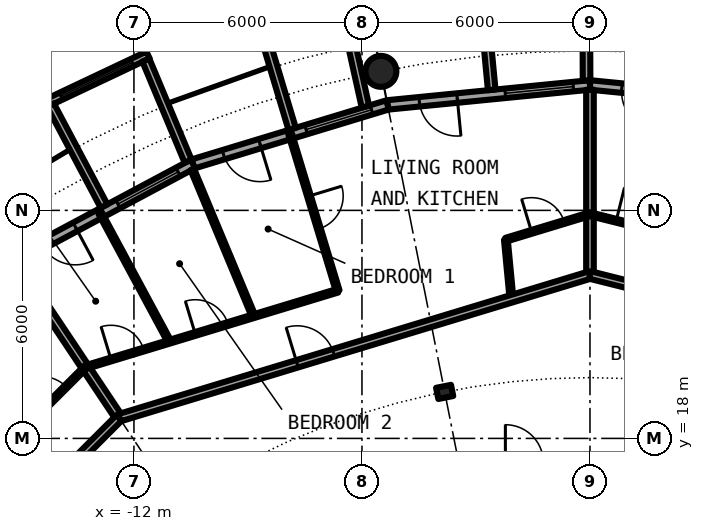
"""IFC4 building model, lengths in metres.
Left out: names, types, materials, properties, quantities, classifications, styles, units other than length and angle.
Written with IfcOpenShell. Run it as: python <this file> out.ifc"""

import sys

from ifc_helpers import new_model, si_unit, direction, frame, frame_2d, origin, origin_2d, place, context, subcontext, project, spatial, rectangle, circle, hollow_circle, i_section, extrude, element, fill, save


model = new_model("IFC4")
c1 = context("Model", 3, precision=1e-05, world=origin(), true_north=direction((0.0, 1.0)))
c2 = subcontext(c1, "Body", "Model", "MODEL_VIEW")
j1 = project(units=[si_unit("LENGTHUNIT", "METRE"), si_unit("PLANEANGLEUNIT", "RADIAN")], contexts=[c1])
p1 = place(None, origin())
s1 = spatial("IfcSite", under=j1, at=p1, CompositionType="ELEMENT")
p2 = place(p1, origin())
s2 = spatial("IfcBuilding", under=s1, at=p2, CompositionType="ELEMENT")
p3 = place(p2, frame((0.0, 0.0, 199.35)))
s3 = spatial("IfcBuildingStorey", under=s2, at=p3, CompositionType="ELEMENT", Elevation=199.35)
p4 = place(p3, frame((-5.501, 27.658, 0.0), z_axis=(0.0, 0.0, 1.0), x_axis=(1.0, 0.0, 0.0)))
e1 = element("IfcColumn", 1, at=p4, inside=s3, PredefinedType="COLUMN", context=c2, shape_type="SweptSolid", body=[
    extrude(hollow_circle(Radius=0.406, WallThickness=0.03, at=origin_2d()), origin(), (0.0, 0.0, 1.0), 3.05),
])
p5 = place(p3, frame((-3.824, 19.223, 0.0), z_axis=(0.0, 0.0, 1.0), x_axis=(-0.195090322016, 0.980785280403, 0.0)))
e2 = element("IfcColumn", 2, at=p5, inside=s3, PredefinedType="COLUMN", context=c2, shape_type="SweptSolid", body=[
    extrude(i_section(OverallWidth=0.3, OverallDepth=0.4, WebThickness=0.013, FlangeThickness=0.024, FilletRadius=0.027, at=origin_2d()), origin(), (0.0, 0.0, 1.0), 3.05),
])
p6 = place(p3, frame((5.326, 26.775, 0.0), z_axis=(0.0, 0.0, 1.0), x_axis=(-0.995173996315, 0.098126026407, 0.0)))
e3 = element("IfcWall", 3, at=p6, inside=s3, PredefinedType="SOLIDWALL", context=c2, shape_type="SweptSolid", body=[
    extrude(rectangle(XDim=5.352, YDim=0.25, at=frame_2d((2.676, 0.0))), origin(), (0.0, 0.0, 1.0), 2.7),
])
p7 = place(p6, frame((0.441, 0.0, 0.3)))
e4 = element("IfcOpeningElement", 4, at=p7, cuts=e3, PredefinedType="OPENING", context=c2, shape_type="SweptSolid", body=[
    extrude(rectangle(XDim=1.8, YDim=2.1, at=frame_2d((0.9, 1.05))), frame((0.0, 0.135, 0.0), z_axis=(0.0, -1.0, 0.0), x_axis=(1.0, 0.0, 0.0)), (0.0, 0.0, 1.0), 0.27),
])
p8 = place(p6, frame((3.51, 0.0, 0.0)))
e5 = element("IfcOpeningElement", 5, at=p8, cuts=e3, PredefinedType="OPENING", context=c2, shape_type="SweptSolid", body=[
    extrude(rectangle(XDim=1.0, YDim=2.2, at=frame_2d((0.5, 1.1))), frame((0.0, 0.135, 0.0), z_axis=(0.0, -1.0, 0.0), x_axis=(1.0, 0.0, 0.0)), (0.0, 0.0, 1.0), 0.27),
])
p9 = place(p3, frame((0.0, 27.3, 0.0), z_axis=(0.0, 0.0, 1.0), x_axis=(-0.995173996315, -0.098126026407, 0.0)))
e6 = element("IfcWall", 6, at=p9, inside=s3, PredefinedType="SOLIDWALL", context=c2, shape_type="SweptSolid", body=[
    extrude(rectangle(XDim=5.352, YDim=0.25, at=frame_2d((2.676, 0.0))), origin(), (0.0, 0.0, 1.0), 2.7),
])
p10 = place(p9, frame((0.441, 0.0, 0.3)))
e7 = element("IfcOpeningElement", 7, at=p10, cuts=e6, PredefinedType="OPENING", context=c2, shape_type="SweptSolid", body=[
    extrude(rectangle(XDim=1.8, YDim=2.1, at=frame_2d((0.9, 1.05))), frame((0.0, 0.135, 0.0), z_axis=(0.0, -1.0, 0.0), x_axis=(1.0, 0.0, 0.0)), (0.0, 0.0, 1.0), 0.27),
])
p11 = place(p9, frame((3.51, 0.0, 0.0)))
e8 = element("IfcOpeningElement", 8, at=p11, cuts=e6, PredefinedType="OPENING", context=c2, shape_type="SweptSolid", body=[
    extrude(rectangle(XDim=1.0, YDim=2.2, at=frame_2d((0.5, 1.1))), frame((0.0, 0.135, 0.0), z_axis=(0.0, -1.0, 0.0), x_axis=(1.0, 0.0, 0.0)), (0.0, 0.0, 1.0), 0.27),
])
p12 = place(p3, frame((-0.09, 27.417, -0.03), z_axis=(0.0, 0.0, 1.0), x_axis=(-0.00347308367, 0.999993968827, 0.0)))
e9 = element("IfcWall", 9, at=p12, inside=s3, PredefinedType="SOLIDWALL", context=c2, shape_type="SweptSolid", body=[
    extrude(rectangle(XDim=2.882, YDim=0.2, at=frame_2d((1.441, 0.0))), origin(), (0.0, 0.0, 1.0), 2.73),
])
p13 = place(p3, frame((-2.586, 27.171, -0.03), z_axis=(0.0, 0.0, 1.0), x_axis=(-0.094548432284, 0.995520262954, 0.0)))
e10 = element("IfcWall", 10, at=p13, inside=s3, PredefinedType="SOLIDWALL", context=c2, shape_type="SweptSolid", body=[
    extrude(rectangle(XDim=3.006, YDim=0.2, at=frame_2d((1.503, 0.0))), origin(), (0.0, 0.0, 1.0), 2.73),
])
p14 = place(p3, frame((-5.326, 26.775, 0.0), z_axis=(0.0, 0.0, 1.0), x_axis=(-0.956965678721, -0.290201119486, 0.0)))
e11 = element("IfcWall", 11, at=p14, inside=s3, PredefinedType="SOLIDWALL", context=c2, shape_type="SweptSolid", body=[
    extrude(rectangle(XDim=5.351, YDim=0.25, at=frame_2d((2.676, 0.0))), origin(), (0.0, 0.0, 1.0), 2.7),
])
p15 = place(p14, frame((0.441, 0.0, 0.3)))
e12 = element("IfcOpeningElement", 12, at=p15, cuts=e11, PredefinedType="OPENING", context=c2, shape_type="SweptSolid", body=[
    extrude(rectangle(XDim=1.8, YDim=2.1, at=frame_2d((0.9, 1.05))), frame((0.0, 0.135, 0.0), z_axis=(0.0, -1.0, 0.0), x_axis=(1.0, 0.0, 0.0)), (0.0, 0.0, 1.0), 0.27),
])
p16 = place(p14, frame((3.51, 0.0, 0.0)))
e13 = element("IfcOpeningElement", 13, at=p16, cuts=e11, PredefinedType="OPENING", context=c2, shape_type="SweptSolid", body=[
    extrude(rectangle(XDim=1.0, YDim=2.2, at=frame_2d((0.5, 1.1))), frame((0.0, 0.135, 0.0), z_axis=(0.0, -1.0, 0.0), x_axis=(1.0, 0.0, 0.0)), (0.0, 0.0, 1.0), 0.27),
])
p17 = place(p3, frame((-5.909, 26.729, -0.03), z_axis=(0.0, 0.0, 1.0), x_axis=(-0.216409053917, 0.976302781612, 0.0)))
e14 = element("IfcWall", 14, at=p17, inside=s3, PredefinedType="SOLIDWALL", context=c2, shape_type="SweptSolid", body=[
    extrude(rectangle(XDim=2.925, YDim=0.2, at=frame_2d((1.463, 0.0))), origin(), (0.0, 0.0, 1.0), 2.73),
])
p18 = place(p3, frame((-7.837, 26.144, -0.03), z_axis=(0.0, 0.0, 1.0), x_axis=(-0.287064767992, 0.957911174889, 0.0)))
e15 = element("IfcWall", 15, at=p18, inside=s3, PredefinedType="SOLIDWALL", context=c2, shape_type="SweptSolid", body=[
    extrude(rectangle(XDim=3.006, YDim=0.2, at=frame_2d((1.503, 0.0))), origin(), (0.0, 0.0, 1.0), 2.73),
])
p19 = place(p3, frame((-10.447, 25.222, 0.0), z_axis=(0.0, 0.0, 1.0), x_axis=(-0.881915646801, -0.471407246368, 0.0)))
e16 = element("IfcWall", 16, at=p19, inside=s3, PredefinedType="SOLIDWALL", context=c2, shape_type="SweptSolid", body=[
    extrude(rectangle(XDim=5.352, YDim=0.25, at=frame_2d((2.676, 0.0))), origin(), (0.0, 0.0, 1.0), 2.7),
])
p20 = place(p19, frame((0.441, 0.0, 0.3)))
e17 = element("IfcOpeningElement", 17, at=p20, cuts=e16, PredefinedType="OPENING", context=c2, shape_type="SweptSolid", body=[
    extrude(rectangle(XDim=1.8, YDim=2.1, at=frame_2d((0.9, 1.05))), frame((0.0, 0.135, 0.0), z_axis=(0.0, -1.0, 0.0), x_axis=(1.0, 0.0, 0.0)), (0.0, 0.0, 1.0), 0.27),
])
p21 = place(p19, frame((3.51, 0.0, 0.0)))
e18 = element("IfcOpeningElement", 18, at=p21, cuts=e16, PredefinedType="OPENING", context=c2, shape_type="SweptSolid", body=[
    extrude(rectangle(XDim=1.0, YDim=2.2, at=frame_2d((0.5, 1.1))), frame((0.0, 0.135, 0.0), z_axis=(0.0, -1.0, 0.0), x_axis=(1.0, 0.0, 0.0)), (0.0, 0.0, 1.0), 0.27),
])
p22 = place(p3, frame((-11.629, 28.088, -0.03), z_axis=(0.0, 0.0, 1.0), x_axis=(-0.904000060331, -0.427532327342, 0.0)))
e19 = element("IfcWall", 19, at=p22, inside=s3, PredefinedType="SOLIDWALL", context=c2, shape_type="SweptSolid", body=[
    extrude(rectangle(XDim=2.993, YDim=0.2, at=frame_2d((1.497, 0.0))), origin(), (0.0, 0.0, 1.0), 2.73),
])
p23 = place(p22, frame((0.457, 0.0, 0.33)))
e20 = element("IfcOpeningElement", 20, at=p23, cuts=e19, PredefinedType="OPENING", context=c2, shape_type="SweptSolid", body=[
    extrude(circle(Radius=1.04, at=frame_2d((1.04, 1.04))), frame((0.0, 0.11, 0.0), z_axis=(0.0, -1.0, 0.0), x_axis=(1.0, 0.0, 0.0)), (0.0, 0.0, 1.0), 0.22),
])
p24 = place(p3, frame((-10.575, 25.295, -0.03), z_axis=(0.0, 0.0, 1.0), x_axis=(-0.385697364644, 0.922625353492, 0.0)))
e21 = element("IfcWall", 21, at=p24, inside=s3, PredefinedType="SOLIDWALL", context=c2, shape_type="SweptSolid", body=[
    extrude(rectangle(XDim=2.883, YDim=0.2, at=frame_2d((1.442, 0.0))), origin(), (0.0, 0.0, 1.0), 2.73),
])
p25 = place(p3, frame((-12.787, 24.113, -0.03), z_axis=(0.0, 0.0, 1.0), x_axis=(-0.468365282436, 0.883534924159, 0.0)))
e22 = element("IfcWall", 22, at=p25, inside=s3, PredefinedType="SOLIDWALL", context=c2, shape_type="SweptSolid", body=[
    extrude(rectangle(XDim=3.006, YDim=0.2, at=frame_2d((1.503, 0.0))), origin(), (0.0, 0.0, 1.0), 2.73),
])
p26 = place(p3, frame((-15.097, 22.596, 0.0), z_axis=(0.0, 0.0, 1.0), x_axis=(0.555462686211, -0.831541462723, 0.0)))
e23 = element("IfcWall", 23, at=p26, inside=s3, PredefinedType="PARTITIONING", context=c2, shape_type="SweptSolid", body=[
    extrude(rectangle(XDim=4.875, YDim=0.2, at=frame_2d((2.438, 0.0))), origin(), (0.0, 0.0, 1.0), 2.7),
])
p27 = place(p3, frame((-12.887, 23.925, 0.0), z_axis=(0.0, 0.0, 1.0), x_axis=(0.474281720599, -0.88037313084, 0.0)))
e24 = element("IfcWall", 24, at=p27, inside=s3, PredefinedType="PARTITIONING", context=c2, shape_type="SweptSolid", body=[
    extrude(rectangle(XDim=3.842, YDim=0.1, at=frame_2d((1.921, 0.0))), origin(), (0.0, 0.0, 1.0), 2.7),
])
p28 = place(p3, frame((-10.465, 25.079, 0.0), z_axis=(0.0, 0.0, 1.0), x_axis=(0.385232176411, -0.922819684585, 0.0)))
e25 = element("IfcWall", 25, at=p28, inside=s3, PredefinedType="PARTITIONING", context=c2, shape_type="SweptSolid", body=[
    extrude(rectangle(XDim=4.187, YDim=0.1, at=frame_2d((2.094, 0.0))), origin(), (0.0, 0.0, 1.0), 2.7),
])
p29 = place(p3, frame((-7.888, 26.005, 0.0), z_axis=(0.0, 0.0, 1.0), x_axis=(0.290193157742, -0.956968093094, 0.0)))
e26 = element("IfcWall", 26, at=p29, inside=s3, PredefinedType="PARTITIONING", context=c2, shape_type="SweptSolid", body=[
    extrude(rectangle(XDim=4.304, YDim=0.1, at=frame_2d((2.152, 0.0))), origin(), (0.0, 0.0, 1.0), 2.7),
])
p30 = place(p29, frame((1.702, 0.0, 0.0)))
e27 = element("IfcOpeningElement", 27, at=p30, cuts=e26, PredefinedType="OPENING", context=c2, shape_type="SweptSolid", body=[
    extrude(rectangle(XDim=0.9, YDim=2.3, at=frame_2d((0.45, 1.15))), frame((0.0, 0.06, 0.0), z_axis=(0.0, -1.0, 0.0), x_axis=(1.0, 0.0, 0.0)), (0.0, 0.0, 1.0), 0.12),
])
p31 = place(p3, frame((-2.213, 23.229, 0.0), z_axis=(0.0, 0.0, 1.0), x_axis=(0.094720578196, -0.995503898569, 0.0)))
e28 = element("IfcWall", 28, at=p31, inside=s3, PredefinedType="PARTITIONING", context=c2, shape_type="SweptSolid", body=[
    extrude(rectangle(XDim=1.562, YDim=0.1, at=frame_2d((0.781, 0.0))), origin(), (0.0, 0.0, 1.0), 2.7),
])
p32 = place(p3, frame((0.0, 22.3, 0.0), z_axis=(0.0, 0.0, 1.0), x_axis=(0.0, 1.0, 0.0)))
e29 = element("IfcWall", 29, at=p32, inside=s3, PredefinedType="PARTITIONING", context=c2, shape_type="SweptSolid", body=[
    extrude(rectangle(XDim=4.875, YDim=0.2, at=frame_2d((2.438, 0.0))), origin(), (0.0, 0.0, 1.0), 2.7),
])
p33 = place(p3, frame((-12.389, 18.542, 0.0), z_axis=(0.0, 0.0, 1.0), x_axis=(0.956942051091, 0.290279022415, 0.0)))
e30 = element("IfcWall", 30, at=p33, inside=s3, PredefinedType="PARTITIONING", context=c2, shape_type="SweptSolid", body=[
    extrude(rectangle(XDim=12.946, YDim=0.2, at=frame_2d((6.473, 0.0))), origin(), (0.0, 0.0, 1.0), 2.7),
])
p34 = place(p33, frame((4.895, 0.0, 0.0)))
e31 = element("IfcOpeningElement", 31, at=p34, cuts=e30, PredefinedType="OPENING", context=c2, shape_type="SweptSolid", body=[
    extrude(rectangle(XDim=1.0, YDim=2.3, at=frame_2d((0.5, 1.15))), frame((0.0, 0.11, 0.0), z_axis=(0.0, -1.0, 0.0), x_axis=(1.0, 0.0, 0.0)), (0.0, 0.0, 1.0), 0.22),
])
p35 = place(p3, frame((0.0, 22.3, 0.0), z_axis=(0.0, 0.0, 1.0), x_axis=(0.969975381822, -0.243203122222, 0.0)))
e32 = element("IfcWall", 32, at=p35, inside=s3, PredefinedType="PARTITIONING", context=c2, shape_type="SweptSolid", body=[
    extrude(rectangle(XDim=10.843, YDim=0.2, at=frame_2d((5.421, 0.0))), origin(), (0.0, 0.0, 1.0), 2.7),
])
p36 = place(p35, frame((6.002, 0.0, 0.0)))
e33 = element("IfcOpeningElement", 33, at=p36, cuts=e32, PredefinedType="OPENING", context=c2, shape_type="SweptSolid", body=[
    extrude(rectangle(XDim=1.0, YDim=2.3, at=frame_2d((0.5, 1.15))), frame((0.0, 0.11, 0.0), z_axis=(0.0, -1.0, 0.0), x_axis=(1.0, 0.0, 0.0)), (0.0, 0.0, 1.0), 0.22),
])
p37 = place(p3, frame((-18.542, 12.389, 0.0), z_axis=(0.0, 0.0, 1.0), x_axis=(0.707106781187, 0.707106781187, 0.0)))
e34 = element("IfcWall", 34, at=p37, inside=s3, PredefinedType="PARTITIONING", context=c2, shape_type="SweptSolid", body=[
    extrude(rectangle(XDim=8.702, YDim=0.2, at=frame_2d((4.351, 0.0))), origin(), (0.0, 0.0, 1.0), 2.7),
])
p38 = place(p37, frame((4.938, 0.0, 0.0)))
e35 = element("IfcOpeningElement", 35, at=p38, cuts=e34, PredefinedType="OPENING", context=c2, shape_type="SweptSolid", body=[
    extrude(rectangle(XDim=1.0, YDim=2.3, at=frame_2d((0.5, 1.15))), frame((0.0, 0.11, 0.0), z_axis=(0.0, -1.0, 0.0), x_axis=(1.0, 0.0, 0.0)), (0.0, 0.0, 1.0), 0.22),
])
p39 = place(p3, frame((-13.281, 19.871, 0.0), z_axis=(0.0, 0.0, 1.0), x_axis=(0.956938868877, 0.290289512785, 0.0)))
e36 = element("IfcWall", 36, at=p39, inside=s3, PredefinedType="PARTITIONING", context=c2, shape_type="SweptSolid", body=[
    extrude(rectangle(XDim=6.941, YDim=0.1, at=frame_2d((3.47, 0.0))), origin(), (0.0, 0.0, 1.0), 2.7),
])
p40 = place(p39, frame((3.025, 0.0, 0.0)))
e37 = element("IfcOpeningElement", 37, at=p40, cuts=e36, PredefinedType="OPENING", context=c2, shape_type="SweptSolid", body=[
    extrude(rectangle(XDim=0.9, YDim=2.3, at=frame_2d((0.45, 1.15))), frame((0.0, 0.06, 0.0), z_axis=(0.0, -1.0, 0.0), x_axis=(1.0, 0.0, 0.0)), (0.0, 0.0, 1.0), 0.12),
])
p41 = place(p39, frame((0.708, 0.0, 0.0)))
e38 = element("IfcOpeningElement", 38, at=p41, cuts=e36, PredefinedType="OPENING", context=c2, shape_type="SweptSolid", body=[
    extrude(rectangle(XDim=0.9, YDim=2.3, at=frame_2d((0.45, 1.15))), frame((0.0, 0.06, 0.0), z_axis=(0.0, -1.0, 0.0), x_axis=(1.0, 0.0, 0.0)), (0.0, 0.0, 1.0), 0.12),
])
p42 = place(p3, frame((-2.216, 23.228, 0.0), z_axis=(0.0, 0.0, 1.0), x_axis=(0.956912517924, 0.290376364464, 0.0)))
e39 = element("IfcWall", 39, at=p42, inside=s3, PredefinedType="PARTITIONING", context=c2, shape_type="SweptSolid", body=[
    extrude(rectangle(XDim=2.314, YDim=0.1, at=frame_2d((1.157, 0.0))), origin(), (0.0, 0.0, 1.0), 2.7),
])
p43 = place(p42, frame((0.71, 0.0, 0.0)))
e40 = element("IfcOpeningElement", 40, at=p43, cuts=e39, PredefinedType="OPENING", context=c2, shape_type="SweptSolid", body=[
    extrude(rectangle(XDim=0.9, YDim=2.3, at=frame_2d((0.45, 1.15))), frame((0.0, 0.06, 0.0), z_axis=(0.0, -1.0, 0.0), x_axis=(1.0, 0.0, 0.0)), (0.0, 0.0, 1.0), 0.12),
])
p44 = place(p3, frame((0.003, 23.899, 0.0), z_axis=(0.0, 0.0, 1.0), x_axis=(0.970074448647, -0.242807668911, 0.0)))
e41 = element("IfcWall", 41, at=p44, inside=s3, PredefinedType="PARTITIONING", context=c2, shape_type="SweptSolid", body=[
    extrude(rectangle(XDim=2.323, YDim=0.1, at=frame_2d((1.161, 0.0))), origin(), (0.0, 0.0, 1.0), 2.7),
])
p45 = place(p44, frame((0.708, 0.0, 0.0)))
e42 = element("IfcOpeningElement", 42, at=p45, cuts=e41, PredefinedType="OPENING", context=c2, shape_type="SweptSolid", body=[
    extrude(rectangle(XDim=0.9, YDim=2.3, at=frame_2d((0.45, 1.15))), frame((0.0, 0.06, 0.0), z_axis=(0.0, -1.0, 0.0), x_axis=(1.0, 0.0, 0.0)), (0.0, 0.0, 1.0), 0.12),
])
p46 = place(p3, frame((-16.575, 16.575, 0.0), z_axis=(0.0, 0.0, 1.0), x_axis=(0.707080600289, 0.707132961115, 0.0)))
e43 = element("IfcWall", 43, at=p46, inside=s3, PredefinedType="PARTITIONING", context=c2, shape_type="SweptSolid", body=[
    extrude(rectangle(XDim=4.663, YDim=0.1, at=frame_2d((2.331, 0.0))), origin(), (0.0, 0.0, 1.0), 2.7),
])
p47 = place(p46, frame((3.043, 0.0, 0.0)))
e44 = element("IfcOpeningElement", 44, at=p47, cuts=e43, PredefinedType="OPENING", context=c2, shape_type="SweptSolid", body=[
    extrude(rectangle(XDim=0.9, YDim=2.3, at=frame_2d((0.45, 1.15))), frame((0.0, 0.06, 0.0), z_axis=(0.0, -1.0, 0.0), x_axis=(1.0, 0.0, 0.0)), (0.0, 0.0, 1.0), 0.12),
])
p48 = place(p8, origin())
e45 = element("IfcDoor", 45, at=p48, inside=s3, OperationType="SINGLE_SWING_LEFT", PredefinedType="DOOR", context=c2, shape_type="SweptSolid", body=[
    extrude(rectangle(XDim=1.0, YDim=2.2, at=frame_2d((0.5, 1.1))), frame((0.0, 0.025, 0.0), z_axis=(0.0, -1.0, 0.0), x_axis=(1.0, 0.0, 0.0)), (0.0, 0.0, 1.0), 0.05),
])
fill(e5, e45)
p49 = place(p10, origin())
e46 = element("IfcWindow", 46, at=p49, inside=s3, PartitioningType="SINGLE_PANEL", PredefinedType="WINDOW", context=c2, shape_type="SweptSolid", body=[
    extrude(rectangle(XDim=1.8, YDim=2.1, at=frame_2d((0.9, 1.05))), frame((0.0, 0.03, 0.0), z_axis=(0.0, -1.0, 0.0), x_axis=(1.0, 0.0, 0.0)), (0.0, 0.0, 1.0), 0.06),
])
fill(e7, e46)
p50 = place(p11, origin())
e47 = element("IfcDoor", 47, at=p50, inside=s3, OperationType="SINGLE_SWING_LEFT", PredefinedType="DOOR", context=c2, shape_type="SweptSolid", body=[
    extrude(rectangle(XDim=1.0, YDim=2.2, at=frame_2d((0.5, 1.1))), frame((0.0, 0.025, 0.0), z_axis=(0.0, -1.0, 0.0), x_axis=(1.0, 0.0, 0.0)), (0.0, 0.0, 1.0), 0.05),
])
fill(e8, e47)
p51 = place(p15, origin())
e48 = element("IfcWindow", 48, at=p51, inside=s3, PartitioningType="SINGLE_PANEL", PredefinedType="WINDOW", context=c2, shape_type="SweptSolid", body=[
    extrude(rectangle(XDim=1.8, YDim=2.1, at=frame_2d((0.9, 1.05))), frame((0.0, 0.03, 0.0), z_axis=(0.0, -1.0, 0.0), x_axis=(1.0, 0.0, 0.0)), (0.0, 0.0, 1.0), 0.06),
])
fill(e12, e48)
p52 = place(p16, origin())
e49 = element("IfcDoor", 49, at=p52, inside=s3, OperationType="SINGLE_SWING_LEFT", PredefinedType="DOOR", context=c2, shape_type="SweptSolid", body=[
    extrude(rectangle(XDim=1.0, YDim=2.2, at=frame_2d((0.5, 1.1))), frame((0.0, 0.025, 0.0), z_axis=(0.0, -1.0, 0.0), x_axis=(1.0, 0.0, 0.0)), (0.0, 0.0, 1.0), 0.05),
])
fill(e13, e49)
p53 = place(p20, origin())
e50 = element("IfcWindow", 50, at=p53, inside=s3, PartitioningType="SINGLE_PANEL", PredefinedType="WINDOW", context=c2, shape_type="SweptSolid", body=[
    extrude(rectangle(XDim=1.8, YDim=2.1, at=frame_2d((0.9, 1.05))), frame((0.0, 0.03, 0.0), z_axis=(0.0, -1.0, 0.0), x_axis=(1.0, 0.0, 0.0)), (0.0, 0.0, 1.0), 0.06),
])
fill(e17, e50)
p54 = place(p23, origin())
e51 = element("IfcWindow", 51, at=p54, inside=s3, PartitioningType="SINGLE_PANEL", PredefinedType="WINDOW", context=c2, shape_type="SweptSolid", body=[
    extrude(circle(Radius=1.04, at=frame_2d((1.04, 1.04))), frame((0.0, 0.03, 0.0), z_axis=(0.0, -1.0, 0.0), x_axis=(1.0, 0.0, 0.0)), (0.0, 0.0, 1.0), 0.06),
])
fill(e20, e51)
p55 = place(p21, origin())
e52 = element("IfcDoor", 52, at=p55, inside=s3, OperationType="SINGLE_SWING_LEFT", PredefinedType="DOOR", context=c2, shape_type="SweptSolid", body=[
    extrude(rectangle(XDim=1.0, YDim=2.2, at=frame_2d((0.5, 1.1))), frame((0.0, 0.025, 0.0), z_axis=(0.0, -1.0, 0.0), x_axis=(1.0, 0.0, 0.0)), (0.0, 0.0, 1.0), 0.05),
])
fill(e18, e52)
p56 = place(p45, origin())
e53 = element("IfcDoor", 53, at=p56, inside=s3, OperationType="SINGLE_SWING_LEFT", PredefinedType="DOOR", context=c2, shape_type="SweptSolid", body=[
    extrude(rectangle(XDim=0.9, YDim=2.3, at=frame_2d((0.45, 1.15))), frame((0.0, 0.025, 0.0), z_axis=(0.0, -1.0, 0.0), x_axis=(1.0, 0.0, 0.0)), (0.0, 0.0, 1.0), 0.05),
])
fill(e42, e53)
p57 = place(p34, origin())
e54 = element("IfcDoor", 54, at=p57, inside=s3, OperationType="SINGLE_SWING_LEFT", PredefinedType="DOOR", context=c2, shape_type="SweptSolid", body=[
    extrude(rectangle(XDim=1.0, YDim=2.3, at=frame_2d((0.5, 1.15))), frame((0.0, 0.025, 0.0), z_axis=(0.0, -1.0, 0.0), x_axis=(1.0, 0.0, 0.0)), (0.0, 0.0, 1.0), 0.05),
])
fill(e31, e54)
p58 = place(p43, origin())
e55 = element("IfcDoor", 55, at=p58, inside=s3, OperationType="SINGLE_SWING_RIGHT", PredefinedType="DOOR", context=c2, shape_type="SweptSolid", body=[
    extrude(rectangle(XDim=0.9, YDim=2.3, at=frame_2d((0.45, 1.15))), frame((0.0, 0.025, 0.0), z_axis=(0.0, -1.0, 0.0), x_axis=(1.0, 0.0, 0.0)), (0.0, 0.0, 1.0), 0.05),
])
fill(e40, e55)
p59 = place(p30, origin())
e56 = element("IfcDoor", 56, at=p59, inside=s3, OperationType="SINGLE_SWING_LEFT", PredefinedType="DOOR", context=c2, shape_type="SweptSolid", body=[
    extrude(rectangle(XDim=0.9, YDim=2.3, at=frame_2d((0.45, 1.15))), frame((0.0, 0.025, 0.0), z_axis=(0.0, -1.0, 0.0), x_axis=(1.0, 0.0, 0.0)), (0.0, 0.0, 1.0), 0.05),
])
fill(e27, e56)
p60 = place(p40, origin())
e57 = element("IfcDoor", 57, at=p60, inside=s3, OperationType="SINGLE_SWING_RIGHT", PredefinedType="DOOR", context=c2, shape_type="SweptSolid", body=[
    extrude(rectangle(XDim=0.9, YDim=2.3, at=frame_2d((0.45, 1.15))), frame((0.0, 0.025, 0.0), z_axis=(0.0, -1.0, 0.0), x_axis=(1.0, 0.0, 0.0)), (0.0, 0.0, 1.0), 0.05),
])
fill(e37, e57)
p61 = place(p41, origin())
e58 = element("IfcDoor", 58, at=p61, inside=s3, OperationType="SINGLE_SWING_LEFT", PredefinedType="DOOR", context=c2, shape_type="SweptSolid", body=[
    extrude(rectangle(XDim=0.9, YDim=2.3, at=frame_2d((0.45, 1.15))), frame((0.0, 0.025, 0.0), z_axis=(0.0, -1.0, 0.0), x_axis=(1.0, 0.0, 0.0)), (0.0, 0.0, 1.0), 0.05),
])
fill(e38, e58)
p62 = place(p47, origin())
e59 = element("IfcDoor", 59, at=p62, inside=s3, OperationType="SINGLE_SWING_RIGHT", PredefinedType="DOOR", context=c2, shape_type="SweptSolid", body=[
    extrude(rectangle(XDim=0.9, YDim=2.3, at=frame_2d((0.45, 1.15))), frame((0.0, 0.025, 0.0), z_axis=(0.0, -1.0, 0.0), x_axis=(1.0, 0.0, 0.0)), (0.0, 0.0, 1.0), 0.05),
])
fill(e44, e59)
save(model, sys.argv[1])
